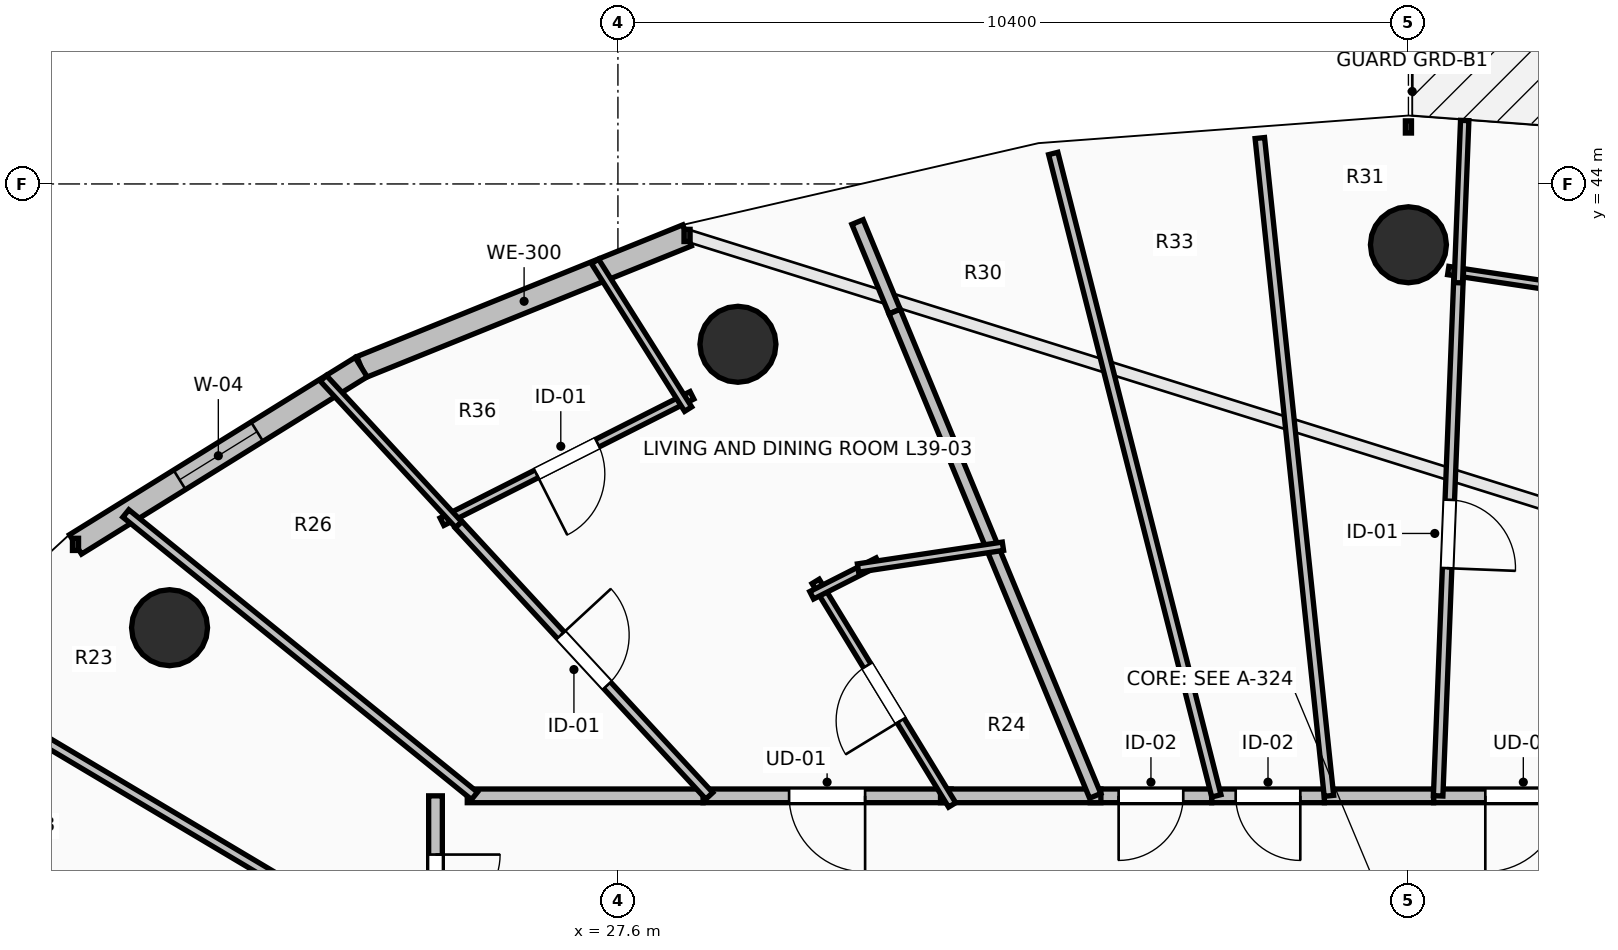
"""IFC4 building model, lengths in metres.
Left out: names, types, materials, properties, quantities, classifications, styles, units other than length and angle.
Written with IfcOpenShell. Run it as: python <this file> out.ifc"""

import sys

from ifc_helpers import new_model, si_unit, direction, frame, frame_2d, origin, origin_2d, place, context, subcontext, project, spatial, rectangle, circle, extrude, element, fill, save


model = new_model("IFC4")
c1 = context("Model", 3, precision=1e-05, world=origin(), true_north=direction((0.0, 1.0)))
c2 = subcontext(c1, "Body", "Model", "MODEL_VIEW")
j1 = project(units=[si_unit("LENGTHUNIT", "METRE"), si_unit("PLANEANGLEUNIT", "RADIAN")], contexts=[c1])
p1 = place(None, origin())
s1 = spatial("IfcSite", under=j1, at=p1, CompositionType="ELEMENT")
p2 = place(p1, origin())
s2 = spatial("IfcBuilding", under=s1, at=p2, CompositionType="ELEMENT")
p3 = place(p2, frame((0.0, 0.0, 146.6)))
s3 = spatial("IfcBuildingStorey", under=s2, at=p3, CompositionType="ELEMENT", Elevation=146.6)
for number, where, z_axis, x_axis in (
    (1, (38.0, 43.2, 0.0), (0.0, 0.0, 1.0), (0.0, 1.0, 0.0)),
    (2, (29.179, 41.891, 0.0), (0.0, 0.0, 1.0), (-0.383, 0.924, 0.0)),
    (3, (21.701, 38.162, 0.0), (0.0, 0.0, 1.0), (-0.707, 0.707, 0.0)),
):
    element("IfcColumn", number, at=place(p3, frame(where, z_axis=z_axis, x_axis=x_axis)), inside=s3, PredefinedType="COLUMN", context=c2, shape_type="SweptSolid", body=[
        extrude(circle(Radius=0.5, at=origin_2d()), origin(), (0.0, 0.0, 1.0), 3.5),
    ])
p4 = place(p3, frame((28.51, 43.323, 0.0), z_axis=(0.0, 0.0, 1.0), x_axis=(-0.927156504392, -0.374674280359, 0.0)))
e4 = element("IfcWall", 4, at=p4, inside=s3, PredefinedType="STANDARD", context=c2, shape_type="SweptSolid", body=[
    extrude(rectangle(XDim=4.625, YDim=0.3, at=frame_2d((2.312, 0.0))), origin(), (0.0, 0.0, 1.0), 3.24),
])
p5 = place(p3, frame((24.222, 41.59, 0.0), z_axis=(0.0, 0.0, 1.0), x_axis=(-0.849721181976, -0.527232313977, 0.0)))
e5 = element("IfcWall", 5, at=p5, inside=s3, PredefinedType="STANDARD", context=c2, shape_type="SweptSolid", body=[
    extrude(rectangle(XDim=4.423, YDim=0.3, at=frame_2d((2.211, 0.0))), origin(), (0.0, 0.0, 1.0), 3.24),
])
p6 = place(p5, frame((1.611, 0.0, 0.85)))
e6 = element("IfcOpeningElement", 6, at=p6, cuts=e5, PredefinedType="OPENING", context=c2, shape_type="SweptSolid", body=[
    extrude(rectangle(XDim=1.2, YDim=1.95, at=frame_2d((0.6, 0.975))), frame((0.0, 0.165, 0.0), z_axis=(0.0, -1.0, 0.0), x_axis=(1.0, 0.0, 0.0)), (0.0, 0.0, 1.0), 0.33),
])
p7 = place(p3, frame((40.692, 35.95, 0.0), z_axis=(0.0, 0.0, 1.0), x_axis=(-1.0, 0.0, 0.0)))
e7 = element("IfcWall", 7, at=p7, inside=s3, PredefinedType="PARTITIONING", context=c2, shape_type="SweptSolid", body=[
    extrude(rectangle(XDim=2.361, YDim=0.18, at=frame_2d((1.18, 0.0))), origin(), (0.0, 0.0, 1.0), 3.24),
])
p8 = place(p7, frame((0.68, 0.0, 0.0)))
e8 = element("IfcOpeningElement", 8, at=p8, cuts=e7, PredefinedType="OPENING", context=c2, shape_type="SweptSolid", body=[
    extrude(rectangle(XDim=1.0, YDim=2.15, at=frame_2d((0.5, 1.075))), frame((0.0, 0.105, 0.0), z_axis=(0.0, -1.0, 0.0), x_axis=(1.0, 0.0, 0.0)), (0.0, 0.0, 1.0), 0.21),
])
p9 = place(p3, frame((38.331, 35.95, 0.0), z_axis=(0.0, 0.0, 1.0), x_axis=(-1.0, 0.0, 0.0)))
e9 = element("IfcWall", 9, at=p9, inside=s3, PredefinedType="PARTITIONING", context=c2, shape_type="SweptSolid", body=[
    extrude(rectangle(XDim=1.437, YDim=0.18, at=frame_2d((0.719, 0.0))), origin(), (0.0, 0.0, 1.0), 3.24),
])
p10 = place(p3, frame((36.894, 35.95, 0.0), z_axis=(0.0, 0.0, 1.0), x_axis=(-1.0, 0.0, 0.0)))
e10 = element("IfcWall", 10, at=p10, inside=s3, PredefinedType="PARTITIONING", context=c2, shape_type="SweptSolid", body=[
    extrude(rectangle(XDim=1.483, YDim=0.18, at=frame_2d((0.742, 0.0))), origin(), (0.0, 0.0, 1.0), 3.24),
])
p11 = place(p10, frame((0.316, 0.0, 0.0)))
e11 = element("IfcOpeningElement", 11, at=p11, cuts=e10, PredefinedType="OPENING", context=c2, shape_type="SweptSolid", body=[
    extrude(rectangle(XDim=0.85, YDim=2.1, at=frame_2d((0.425, 1.05))), frame((0.0, 0.105, 0.0), z_axis=(0.0, -1.0, 0.0), x_axis=(1.0, 0.0, 0.0)), (0.0, 0.0, 1.0), 0.21),
])
p12 = place(p3, frame((35.411, 35.95, 0.0), z_axis=(0.0, 0.0, 1.0), x_axis=(-1.0, 0.0, 0.0)))
e12 = element("IfcWall", 12, at=p12, inside=s3, PredefinedType="PARTITIONING", context=c2, shape_type="SweptSolid", body=[
    extrude(rectangle(XDim=1.597, YDim=0.18, at=frame_2d((0.798, 0.0))), origin(), (0.0, 0.0, 1.0), 3.24),
])
p13 = place(p12, frame((0.374, 0.0, 0.0)))
e13 = element("IfcOpeningElement", 13, at=p13, cuts=e12, PredefinedType="OPENING", context=c2, shape_type="SweptSolid", body=[
    extrude(rectangle(XDim=0.85, YDim=2.1, at=frame_2d((0.425, 1.05))), frame((0.0, 0.105, 0.0), z_axis=(0.0, -1.0, 0.0), x_axis=(1.0, 0.0, 0.0)), (0.0, 0.0, 1.0), 0.21),
])
p14 = place(p3, frame((31.984, 35.95, 0.0), z_axis=(0.0, 0.0, 1.0), x_axis=(-1.0, 0.0, 0.0)))
e14 = element("IfcWall", 14, at=p14, inside=s3, PredefinedType="PARTITIONING", context=c2, shape_type="SweptSolid", body=[
    extrude(rectangle(XDim=3.264, YDim=0.18, at=frame_2d((1.632, 0.0))), origin(), (0.0, 0.0, 1.0), 2.432),
])
p15 = place(p14, frame((1.132, 0.0, 0.0)))
e15 = element("IfcOpeningElement", 15, at=p15, cuts=e14, PredefinedType="OPENING", context=c2, shape_type="SweptSolid", body=[
    extrude(rectangle(XDim=1.0, YDim=2.15, at=frame_2d((0.5, 1.075))), frame((0.0, 0.105, 0.0), z_axis=(0.0, -1.0, 0.0), x_axis=(1.0, 0.0, 0.0)), (0.0, 0.0, 1.0), 0.21),
])
p16 = place(p3, frame((33.954, 35.95, 0.0), z_axis=(0.0, 0.0, 1.0), x_axis=(-1.0, 0.0, 0.0)))
e16 = element("IfcWall", 16, at=p16, inside=s3, PredefinedType="PARTITIONING", context=c2, shape_type="SweptSolid", body=[
    extrude(rectangle(XDim=2.11, YDim=0.18, at=frame_2d((1.055, 0.0))), origin(), (0.0, 0.0, 1.0), 3.24),
])
p17 = place(p3, frame((28.72, 35.95, 0.0), z_axis=(0.0, 0.0, 1.0), x_axis=(-1.0, 0.0, 0.0)))
e17 = element("IfcWall", 17, at=p17, inside=s3, PredefinedType="PARTITIONING", context=c2, shape_type="SweptSolid", body=[
    extrude(rectangle(XDim=3.102, YDim=0.18, at=frame_2d((1.551, 0.0))), origin(), (0.0, 0.0, 1.0), 2.432),
])
p18 = place(p3, frame((25.2, 35.95, 0.0), z_axis=(0.0, 0.0, 1.0), x_axis=(0.0, -1.0, 0.0)))
e18 = element("IfcWall", 18, at=p18, inside=s3, PredefinedType="PARTITIONING", context=c2, shape_type="SweptSolid", body=[
    extrude(rectangle(XDim=2.395, YDim=0.18, at=frame_2d((1.198, 0.0))), origin(), (0.0, 0.0, 1.0), 2.432),
])
p19 = place(p18, frame((0.772, 0.0, 0.0)))
e19 = element("IfcOpeningElement", 19, at=p19, cuts=e18, PredefinedType="OPENING", context=c2, shape_type="SweptSolid", body=[
    extrude(rectangle(XDim=0.85, YDim=2.1, at=frame_2d((0.425, 1.05))), frame((0.0, 0.105, 0.0), z_axis=(0.0, -1.0, 0.0), x_axis=(1.0, 0.0, 0.0)), (0.0, 0.0, 1.0), 0.21),
])
p20 = place(p3, frame((41.854, 42.36, 0.0), z_axis=(0.0, 0.0, 1.0), x_axis=(-0.988887919082, 0.148662986296, 0.0)))
e20 = element("IfcWall", 20, at=p20, inside=s3, PredefinedType="PARTITIONING", context=c2, shape_type="SweptSolid", body=[
    extrude(rectangle(XDim=3.368, YDim=0.11, at=frame_2d((1.684, 0.0))), origin(), (0.0, 0.0, 1.0), 3.24),
])
p21 = place(p20, frame((1.234, 0.0, 0.0)))
e21 = element("IfcOpeningElement", 21, at=p21, cuts=e20, PredefinedType="OPENING", context=c2, shape_type="SweptSolid", body=[
    extrude(rectangle(XDim=0.9, YDim=2.1, at=frame_2d((0.45, 1.05))), frame((0.0, 0.07, 0.0), z_axis=(0.0, -1.0, 0.0), x_axis=(1.0, 0.0, 0.0)), (0.0, 0.0, 1.0), 0.14),
])
p22 = place(p3, frame((38.662, 42.84, 0.0), z_axis=(0.0, 0.0, 1.0), x_axis=(-0.039300632457, -0.999227431713, 0.0)))
e22 = element("IfcWall", 22, at=p22, inside=s3, PredefinedType="PARTITIONING", context=c2, shape_type="SweptSolid", body=[
    extrude(rectangle(XDim=6.896, YDim=0.125, at=frame_2d((3.448, 0.0))), origin(), (0.0, 0.0, 1.0), 2.922),
])
p23 = place(p22, frame((2.998, 0.0, 0.0)))
e23 = element("IfcOpeningElement", 23, at=p23, cuts=e22, PredefinedType="OPENING", context=c2, shape_type="SweptSolid", body=[
    extrude(rectangle(XDim=0.9, YDim=2.1, at=frame_2d((0.45, 1.05))), frame((0.0, 0.077, 0.0), z_axis=(0.0, -1.0, 0.0), x_axis=(1.0, 0.0, 0.0)), (0.0, 0.0, 1.0), 0.155),
])
p24 = place(p3, frame((38.74, 44.835, 0.0), z_axis=(0.0, 0.0, 1.0), x_axis=(-0.039310852952, -0.999227029679, 0.0)))
e24 = element("IfcWall", 24, at=p24, inside=s3, PredefinedType="PARTITIONING", context=c2, shape_type="SweptSolid", body=[
    extrude(rectangle(XDim=2.136, YDim=0.11, at=frame_2d((1.068, 0.0))), origin(), (0.0, 0.0, 1.0), 2.728),
])
p25 = place(p3, frame((36.045, 44.604, 0.0), z_axis=(0.0, 0.0, 1.0), x_axis=(0.104483235172, -0.994526647993, 0.0)))
e25 = element("IfcWall", 25, at=p25, inside=s3, PredefinedType="PARTITIONING", context=c2, shape_type="SweptSolid", body=[
    extrude(rectangle(XDim=8.702, YDim=0.125, at=frame_2d((4.351, 0.0))), origin(), (0.0, 0.0, 1.0), 2.432),
])
p26 = place(p3, frame((33.327, 44.401, 0.0), z_axis=(0.0, 0.0, 1.0), x_axis=(0.246124619458, -0.969238191415, 0.0)))
e26 = element("IfcWall", 26, at=p26, inside=s3, PredefinedType="PARTITIONING", context=c2, shape_type="SweptSolid", body=[
    extrude(rectangle(XDim=8.719, YDim=0.125, at=frame_2d((4.36, 0.0))), origin(), (0.0, 0.0, 1.0), 2.432),
])
p27 = place(p3, frame((30.752, 43.499, 0.0), z_axis=(0.0, 0.0, 1.0), x_axis=(0.382752000821, -0.923851127546, 0.0)))
e27 = element("IfcWall", 27, at=p27, inside=s3, PredefinedType="PARTITIONING", context=c2, shape_type="SweptSolid", body=[
    extrude(rectangle(XDim=1.275, YDim=0.16, at=frame_2d((0.638, 0.0))), origin(), (0.0, 0.0, 1.0), 2.728),
])
p28 = place(p3, frame((31.24, 42.321, 0.0), z_axis=(0.0, 0.0, 1.0), x_axis=(0.382673849319, -0.923883501881, 0.0)))
e28 = element("IfcWall", 28, at=p28, inside=s3, PredefinedType="PARTITIONING", context=c2, shape_type="SweptSolid", body=[
    extrude(rectangle(XDim=6.896, YDim=0.16, at=frame_2d((3.448, 0.0))), origin(), (0.0, 0.0, 1.0), 2.432),
])
p29 = place(p3, frame((31.997, 35.831, 0.0), z_axis=(0.0, 0.0, 1.0), x_axis=(-0.521220733209, 0.853421904613, 0.0)))
e29 = element("IfcWall", 29, at=p29, inside=s3, PredefinedType="PARTITIONING", context=c2, shape_type="SweptSolid", body=[
    extrude(rectangle(XDim=3.446, YDim=0.11, at=frame_2d((1.723, 0.0))), origin(), (0.0, 0.0, 1.0), 2.432),
])
p30 = place(p29, frame((1.298, 0.0, 0.0)))
e30 = element("IfcOpeningElement", 30, at=p30, cuts=e29, PredefinedType="OPENING", context=c2, shape_type="SweptSolid", body=[
    extrude(rectangle(XDim=0.85, YDim=2.1, at=frame_2d((0.425, 1.05))), frame((0.0, 0.07, 0.0), z_axis=(0.0, -1.0, 0.0), x_axis=(1.0, 0.0, 0.0)), (0.0, 0.0, 1.0), 0.14),
])
p31 = place(p3, frame((30.149, 38.589, 0.0), z_axis=(0.0, 0.0, 1.0), x_axis=(0.891868081409, 0.452295617229, 0.0)))
e31 = element("IfcWall", 31, at=p31, inside=s3, PredefinedType="PARTITIONING", context=c2, shape_type="SweptSolid", body=[
    extrude(rectangle(XDim=0.979, YDim=0.11, at=frame_2d((0.489, 0.0))), origin(), (0.0, 0.0, 1.0), 2.922),
])
p32 = place(p3, frame((30.759, 38.947, 0.0), z_axis=(0.0, 0.0, 1.0), x_axis=(0.988889867338, 0.148650026153, 0.0)))
e32 = element("IfcWall", 32, at=p32, inside=s3, PredefinedType="PARTITIONING", context=c2, shape_type="SweptSolid", body=[
    extrude(rectangle(XDim=1.928, YDim=0.11, at=frame_2d((0.964, 0.0))), origin(), (0.0, 0.0, 1.0), 2.922),
])
p33 = place(p3, frame((28.574, 41.219, 0.0), z_axis=(0.0, 0.0, 1.0), x_axis=(-0.892470920122, -0.451104928744, 0.0)))
e33 = element("IfcWall", 33, at=p33, inside=s3, PredefinedType="PARTITIONING", context=c2, shape_type="SweptSolid", body=[
    extrude(rectangle(XDim=3.685, YDim=0.11, at=frame_2d((1.843, 0.0))), origin(), (0.0, 0.0, 1.0), 3.24),
])
p34 = place(p33, frame((1.393, 0.0, 0.0)))
e34 = element("IfcOpeningElement", 34, at=p34, cuts=e33, PredefinedType="OPENING", context=c2, shape_type="SweptSolid", body=[
    extrude(rectangle(XDim=0.9, YDim=2.1, at=frame_2d((0.45, 1.05))), frame((0.0, 0.07, 0.0), z_axis=(0.0, -1.0, 0.0), x_axis=(1.0, 0.0, 0.0)), (0.0, 0.0, 1.0), 0.14),
])
p35 = place(p3, frame((25.505, 39.517, 0.0), z_axis=(0.0, 0.0, 1.0), x_axis=(-0.678720806978, 0.734396395808, 0.0)))
e35 = element("IfcWall", 35, at=p35, inside=s3, PredefinedType="PARTITIONING", context=c2, shape_type="SweptSolid", body=[
    extrude(rectangle(XDim=2.622, YDim=0.11, at=frame_2d((1.311, 0.0))), origin(), (0.0, 0.0, 1.0), 2.728),
])
p36 = place(p3, frame((27.298, 42.981, 0.0), z_axis=(0.0, 0.0, 1.0), x_axis=(0.533261254764, -0.845950609769, 0.0)))
e36 = element("IfcWall", 36, at=p36, inside=s3, PredefinedType="PARTITIONING", context=c2, shape_type="SweptSolid", body=[
    extrude(rectangle(XDim=2.298, YDim=0.11, at=frame_2d((1.149, 0.0))), origin(), (0.0, 0.0, 1.0), 2.728),
])
p37 = place(p3, frame((25.505, 39.517, 0.0), z_axis=(0.0, 0.0, 1.0), x_axis=(0.678766339668, -0.734354312395, 0.0)))
e37 = element("IfcWall", 37, at=p37, inside=s3, PredefinedType="PARTITIONING", context=c2, shape_type="SweptSolid", body=[
    extrude(rectangle(XDim=4.857, YDim=0.125, at=frame_2d((2.429, 0.0))), origin(), (0.0, 0.0, 1.0), 2.432),
])
p38 = place(p37, frame((1.979, 0.0, 0.0)))
e38 = element("IfcOpeningElement", 38, at=p38, cuts=e37, PredefinedType="OPENING", context=c2, shape_type="SweptSolid", body=[
    extrude(rectangle(XDim=0.9, YDim=2.1, at=frame_2d((0.45, 1.05))), frame((0.0, 0.077, 0.0), z_axis=(0.0, -1.0, 0.0), x_axis=(1.0, 0.0, 0.0)), (0.0, 0.0, 1.0), 0.155),
])
p39 = place(p3, frame((21.126, 39.665, 0.0), z_axis=(0.0, 0.0, 1.0), x_axis=(0.777089771819, -0.629389773141, 0.0)))
e39 = element("IfcWall", 39, at=p39, inside=s3, PredefinedType="PARTITIONING", context=c2, shape_type="SweptSolid", body=[
    extrude(rectangle(XDim=5.903, YDim=0.125, at=frame_2d((2.951, 0.0))), origin(), (0.0, 0.0, 1.0), 2.728),
])
p40 = place(p3, frame((18.603, 37.54, 0.0), z_axis=(0.0, 0.0, 1.0), x_axis=(0.859389720334, -0.511321140365, 0.0)))
e40 = element("IfcWall", 40, at=p40, inside=s3, PredefinedType="PARTITIONING", context=c2, shape_type="SweptSolid", body=[
    extrude(rectangle(XDim=7.676, YDim=0.125, at=frame_2d((3.838, 0.0))), origin(), (0.0, 0.0, 1.0), 2.728),
])
p41 = place(p3, frame((16.355, 34.966, 0.0), z_axis=(0.0, 0.0, 1.0), x_axis=(0.923874659351, -0.382695197002, 0.0)))
e41 = element("IfcWall", 41, at=p41, inside=s3, PredefinedType="PARTITIONING", context=c2, shape_type="SweptSolid", body=[
    extrude(rectangle(XDim=4.353, YDim=0.16, at=frame_2d((2.177, 0.0))), origin(), (0.0, 0.0, 1.0), 2.728),
])
p42 = place(p6, origin())
e42 = element("IfcWindow", 42, at=p42, inside=s3, PartitioningType="SINGLE_PANEL", PredefinedType="WINDOW", context=c2, shape_type="SweptSolid", body=[
    extrude(rectangle(XDim=1.2, YDim=1.95, at=frame_2d((0.6, 0.975))), frame((0.0, 0.03, 0.0), z_axis=(0.0, -1.0, 0.0), x_axis=(1.0, 0.0, 0.0)), (0.0, 0.0, 1.0), 0.06),
])
fill(e6, e42)
p43 = place(p8, origin())
e43 = element("IfcDoor", 43, at=p43, inside=s3, OperationType="SINGLE_SWING_RIGHT", PredefinedType="DOOR", context=c2, shape_type="SweptSolid", body=[
    extrude(rectangle(XDim=1.0, YDim=2.15, at=frame_2d((0.5, 1.075))), frame((0.0, 0.025, 0.0), z_axis=(0.0, -1.0, 0.0), x_axis=(1.0, 0.0, 0.0)), (0.0, 0.0, 1.0), 0.05),
])
fill(e8, e43)
p44 = place(p15, origin())
e44 = element("IfcDoor", 44, at=p44, inside=s3, OperationType="SINGLE_SWING_LEFT", PredefinedType="DOOR", context=c2, shape_type="SweptSolid", body=[
    extrude(rectangle(XDim=1.0, YDim=2.15, at=frame_2d((0.5, 1.075))), frame((0.0, 0.025, 0.0), z_axis=(0.0, -1.0, 0.0), x_axis=(1.0, 0.0, 0.0)), (0.0, 0.0, 1.0), 0.05),
])
fill(e15, e44)
p45 = place(p23, origin())
e45 = element("IfcDoor", 45, at=p45, inside=s3, OperationType="SINGLE_SWING_RIGHT", PredefinedType="DOOR", context=c2, shape_type="SweptSolid", body=[
    extrude(rectangle(XDim=0.9, YDim=2.1, at=frame_2d((0.45, 1.05))), frame((0.0, 0.025, 0.0), z_axis=(0.0, -1.0, 0.0), x_axis=(1.0, 0.0, 0.0)), (0.0, 0.0, 1.0), 0.05),
])
fill(e23, e45)
p46 = place(p30, origin())
e46 = element("IfcDoor", 46, at=p46, inside=s3, OperationType="SINGLE_SWING_LEFT", PredefinedType="DOOR", context=c2, shape_type="SweptSolid", body=[
    extrude(rectangle(XDim=0.85, YDim=2.1, at=frame_2d((0.425, 1.05))), frame((0.0, 0.025, 0.0), z_axis=(0.0, -1.0, 0.0), x_axis=(1.0, 0.0, 0.0)), (0.0, 0.0, 1.0), 0.05),
])
fill(e30, e46)
p47 = place(p34, origin())
e47 = element("IfcDoor", 47, at=p47, inside=s3, OperationType="SINGLE_SWING_RIGHT", PredefinedType="DOOR", context=c2, shape_type="SweptSolid", body=[
    extrude(rectangle(XDim=0.9, YDim=2.1, at=frame_2d((0.45, 1.05))), frame((0.0, 0.025, 0.0), z_axis=(0.0, -1.0, 0.0), x_axis=(1.0, 0.0, 0.0)), (0.0, 0.0, 1.0), 0.05),
])
fill(e34, e47)
p48 = place(p38, origin())
e48 = element("IfcDoor", 48, at=p48, inside=s3, OperationType="SINGLE_SWING_LEFT", PredefinedType="DOOR", context=c2, shape_type="SweptSolid", body=[
    extrude(rectangle(XDim=0.9, YDim=2.1, at=frame_2d((0.45, 1.05))), frame((0.0, 0.025, 0.0), z_axis=(0.0, -1.0, 0.0), x_axis=(1.0, 0.0, 0.0)), (0.0, 0.0, 1.0), 0.05),
])
fill(e38, e48)
p49 = place(p11, origin())
e49 = element("IfcDoor", 49, at=p49, inside=s3, OperationType="SINGLE_SWING_LEFT", PredefinedType="DOOR", context=c2, shape_type="SweptSolid", body=[
    extrude(rectangle(XDim=0.85, YDim=2.1, at=frame_2d((0.425, 1.05))), frame((0.0, 0.025, 0.0), z_axis=(0.0, -1.0, 0.0), x_axis=(1.0, 0.0, 0.0)), (0.0, 0.0, 1.0), 0.05),
])
fill(e11, e49)
p50 = place(p13, origin())
e50 = element("IfcDoor", 50, at=p50, inside=s3, OperationType="SINGLE_SWING_RIGHT", PredefinedType="DOOR", context=c2, shape_type="SweptSolid", body=[
    extrude(rectangle(XDim=0.85, YDim=2.1, at=frame_2d((0.425, 1.05))), frame((0.0, 0.025, 0.0), z_axis=(0.0, -1.0, 0.0), x_axis=(1.0, 0.0, 0.0)), (0.0, 0.0, 1.0), 0.05),
])
fill(e13, e50)
p51 = place(p19, origin())
e51 = element("IfcDoor", 51, at=p51, inside=s3, OperationType="SINGLE_SWING_LEFT", PredefinedType="DOOR", context=c2, shape_type="SweptSolid", body=[
    extrude(rectangle(XDim=0.85, YDim=2.1, at=frame_2d((0.425, 1.05))), frame((0.0, 0.025, 0.0), z_axis=(0.0, -1.0, 0.0), x_axis=(1.0, 0.0, 0.0)), (0.0, 0.0, 1.0), 0.05),
])
fill(e19, e51)
save(model, sys.argv[1])
